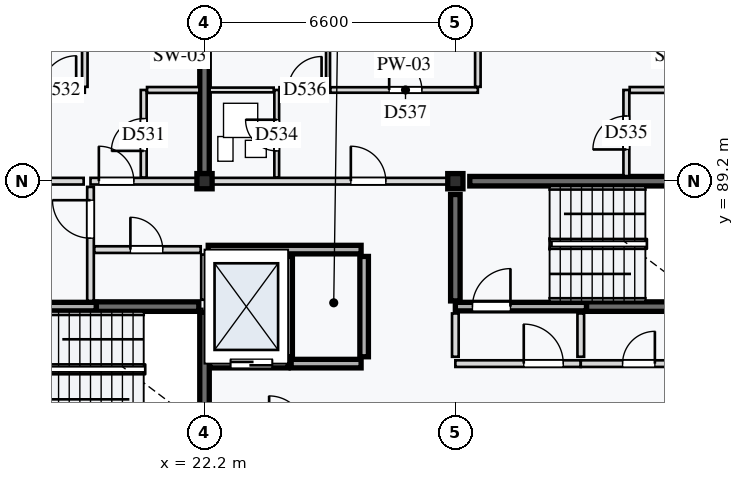
"""IFC4 building model, lengths in metres.
Left out: names, types, materials, properties, quantities, classifications, styles, units other than length and angle.
Written with IfcOpenShell. Run it as: python <this file> out.ifc"""

import sys

from ifc_helpers import new_model, si_unit, direction, frame, frame_2d, origin, origin_2d, place, context, subcontext, project, spatial, rectangle, extrude, element, fill, save


model = new_model("IFC4")
c1 = context("Model", 3, precision=1e-05, world=origin(), true_north=direction((0.0, 1.0)))
c2 = subcontext(c1, "Body", "Model", "MODEL_VIEW")
j1 = project(units=[si_unit("LENGTHUNIT", "METRE"), si_unit("PLANEANGLEUNIT", "RADIAN")], contexts=[c1])
p1 = place(None, origin())
s1 = spatial("IfcSite", under=j1, at=p1, CompositionType="ELEMENT")
p2 = place(p1, origin())
s2 = spatial("IfcBuilding", under=s1, at=p2, CompositionType="ELEMENT")
p3 = place(p2, frame((0.0, 0.0, 53.2)))
s3 = spatial("IfcBuildingStorey", under=s2, at=p3, CompositionType="ELEMENT", Elevation=53.2)
for number, where, z_axis, x_axis in (
    (1, (22.2, 89.2, 0.0), (0.0, 0.0, 1.0), (1.0, 0.0, 0.0)),
    (2, (28.8, 89.2, 0.0), (0.0, 0.0, 1.0), (1.0, 0.0, 0.0)),
):
    element("IfcColumn", number, at=place(p3, frame(where, z_axis=z_axis, x_axis=x_axis)), inside=s3, PredefinedType="COLUMN", context=c2, shape_type="SweptSolid", body=[
        extrude(rectangle(XDim=0.4, YDim=0.4, at=origin_2d()), origin(), (0.0, 0.0, 1.0), 3.2),
    ])
p4 = place(p3, frame((19.35, 85.9, 0.0), z_axis=(0.0, 0.0, 1.0), x_axis=(1.0, 0.0, 0.0)))
e3 = element("IfcWall", 3, at=p4, inside=s3, PredefinedType="SHEAR", context=c2, shape_type="SweptSolid", body=[
    extrude(rectangle(XDim=2.7, YDim=0.25, at=frame_2d((1.35, 0.0))), origin(), (0.0, 0.0, 1.0), 2.98),
])
p5 = place(p3, frame((22.2, 82.95, 0.0), z_axis=(0.0, 0.0, 1.0), x_axis=(0.0, 1.0, 0.0)))
e4 = element("IfcWall", 4, at=p5, inside=s3, PredefinedType="SHEAR", context=c2, shape_type="SweptSolid", body=[
    extrude(rectangle(XDim=2.8, YDim=0.25, at=frame_2d((1.4, 0.0))), origin(), (0.0, 0.0, 1.0), 2.98),
])
p6 = place(p3, frame((29.18, 89.2, 0.0), z_axis=(0.0, 0.0, 1.0), x_axis=(1.0, 0.0, 0.0)))
e5 = element("IfcWall", 5, at=p6, inside=s3, PredefinedType="SHEAR", context=c2, shape_type="SweptSolid", body=[
    extrude(rectangle(XDim=5.84, YDim=0.25, at=frame_2d((2.92, 0.0))), origin(), (0.0, 0.0, 1.0), 2.98),
])
for number, where, z_axis, x_axis in (
    (6, (32.25, 85.9, 0.0), (0.0, 0.0, 1.0), (1.0, 0.0, 0.0)),
    (7, (28.8, 86.05, 0.0), (0.0, 0.0, 1.0), (0.0, 1.0, 0.0)),
):
    element("IfcWall", number, at=place(p3, frame(where, z_axis=z_axis, x_axis=x_axis)), inside=s3, PredefinedType="SHEAR", context=c2, shape_type="SweptSolid", body=[
        extrude(rectangle(XDim=2.8, YDim=0.25, at=frame_2d((1.4, 0.0))), origin(), (0.0, 0.0, 1.0), 2.98),
    ])
p7 = place(p3, frame((22.2, 89.4, 0.0), z_axis=(0.0, 0.0, 1.0), x_axis=(0.0, 1.0, 0.0)))
e8 = element("IfcWall", 8, at=p7, inside=s3, PredefinedType="SHEAR", context=c2, shape_type="SweptSolid", body=[
    extrude(rectangle(XDim=6.2, YDim=0.25, at=frame_2d((3.1, 0.0))), origin(), (0.0, 0.0, 1.0), 2.98),
])
p8 = place(p3, frame((15.75, 85.9, 0.0), z_axis=(0.0, 0.0, 1.0), x_axis=(1.0, 0.0, 0.0)))
e9 = element("IfcWall", 9, at=p8, inside=s3, PredefinedType="STANDARD", context=c2, shape_type="SweptSolid", body=[
    extrude(rectangle(XDim=3.6, YDim=0.225, at=frame_2d((1.8, 0.0))), origin(), (0.0, 0.0, 1.0), 2.945),
])
p9 = place(p8, frame((0.45, 0.0, 0.0)))
e10 = element("IfcOpeningElement", 10, at=p9, cuts=e9, PredefinedType="OPENING", context=c2, shape_type="SweptSolid", body=[
    extrude(rectangle(XDim=1.0, YDim=2.1, at=frame_2d((0.5, 1.05))), frame((0.0, 0.123, 0.0), z_axis=(0.0, -1.0, 0.0), x_axis=(1.0, 0.0, 0.0)), (0.0, 0.0, 1.0), 0.245),
])
p10 = place(p3, frame((19.2, 86.05, 0.0), z_axis=(0.0, 0.0, 1.0), x_axis=(0.0, 1.0, 0.0)))
e11 = element("IfcWall", 11, at=p10, inside=s3, PredefinedType="PARTITIONING", context=c2, shape_type="SweptSolid", body=[
    extrude(rectangle(XDim=3.0, YDim=0.175, at=frame_2d((1.5, 0.0))), origin(), (0.0, 0.0, 1.0), 2.945),
])
p11 = place(p10, frame((1.65, 0.0, 0.0)))
e12 = element("IfcOpeningElement", 12, at=p11, cuts=e11, PredefinedType="OPENING", context=c2, shape_type="SweptSolid", body=[
    extrude(rectangle(XDim=1.0, YDim=2.16, at=frame_2d((0.5, 1.08))), frame((0.0, 0.097, 0.0), z_axis=(0.0, -1.0, 0.0), x_axis=(1.0, 0.0, 0.0)), (0.0, 0.0, 1.0), 0.195),
])
p12 = place(p3, frame((19.3, 87.4, 0.0), z_axis=(0.0, 0.0, 1.0), x_axis=(1.0, 0.0, 0.0)))
e13 = element("IfcWall", 13, at=p12, inside=s3, PredefinedType="PARTITIONING", context=c2, shape_type="SweptSolid", body=[
    extrude(rectangle(XDim=2.8, YDim=0.175, at=frame_2d((1.4, 0.0))), origin(), (0.0, 0.0, 1.0), 2.945),
])
p13 = place(p12, frame((0.95, 0.0, 0.0)))
e14 = element("IfcOpeningElement", 14, at=p13, cuts=e13, PredefinedType="OPENING", context=c2, shape_type="SweptSolid", body=[
    extrude(rectangle(XDim=0.85, YDim=2.0, at=frame_2d((0.425, 1.0))), frame((0.0, 0.097, 0.0), z_axis=(0.0, -1.0, 0.0), x_axis=(1.0, 0.0, 0.0)), (0.0, 0.0, 1.0), 0.195),
])
p14 = place(p3, frame((22.2, 86.08, 0.0), z_axis=(0.0, 0.0, 1.0), x_axis=(0.0, 1.0, 0.0)))
e15 = element("IfcWall", 15, at=p14, inside=s3, PredefinedType="PARTITIONING", context=c2, shape_type="SweptSolid", body=[
    extrude(rectangle(XDim=1.19, YDim=0.175, at=frame_2d((0.595, 0.0))), origin(), (0.0, 0.0, 1.0), 2.945),
])
p15 = place(p3, frame((22.335, 84.4, 0.0), z_axis=(0.0, 0.0, 1.0), x_axis=(1.0, 0.0, 0.0)))
e16 = element("IfcWall", 16, at=p15, inside=s3, PredefinedType="STANDARD", context=c2, shape_type="SweptSolid", body=[
    extrude(rectangle(XDim=2.065, YDim=0.225, at=frame_2d((1.032, 0.0))), origin(), (0.0, 0.0, 1.0), 2.945),
])
p16 = place(p15, frame((0.55, 0.0, 0.0)))
e17 = element("IfcOpeningElement", 17, at=p16, cuts=e16, PredefinedType="OPENING", context=c2, shape_type="SweptSolid", body=[
    extrude(rectangle(XDim=1.1, YDim=2.1, at=frame_2d((0.55, 1.05))), frame((0.0, 0.123, 0.0), z_axis=(0.0, -1.0, 0.0), x_axis=(1.0, 0.0, 0.0)), (0.0, 0.0, 1.0), 0.245),
])
p17 = place(p3, frame((24.48, 84.4, 0.0), z_axis=(0.0, 0.0, 1.0), x_axis=(1.0, 0.0, 0.0)))
e18 = element("IfcWall", 18, at=p17, inside=s3, PredefinedType="STANDARD", context=c2, shape_type="SweptSolid", body=[
    extrude(rectangle(XDim=1.84, YDim=0.225, at=frame_2d((0.92, 0.0))), origin(), (0.0, 0.0, 1.0), 2.945),
])
p18 = place(p3, frame((22.298, 87.4, 0.0), z_axis=(0.0, 0.0, 1.0), x_axis=(1.0, 0.0, 0.0)))
e19 = element("IfcWall", 19, at=p18, inside=s3, PredefinedType="STANDARD", context=c2, shape_type="SweptSolid", body=[
    extrude(rectangle(XDim=4.022, YDim=0.225, at=frame_2d((2.011, 0.0))), origin(), (0.0, 0.0, 1.0), 2.945),
])
for number, where, z_axis, x_axis in (
    (20, (24.4, 84.58, 0.0), (0.0, 0.0, 1.0), (0.0, 1.0, 0.0)),
    (21, (26.4, 84.58, 0.0), (0.0, 0.0, 1.0), (0.0, 1.0, 0.0)),
):
    element("IfcWall", number, at=place(p3, frame(where, z_axis=z_axis, x_axis=x_axis)), inside=s3, PredefinedType="STANDARD", context=c2, shape_type="SweptSolid", body=[
        extrude(rectangle(XDim=2.64, YDim=0.225, at=frame_2d((1.32, 0.0))), origin(), (0.0, 0.0, 1.0), 2.945),
    ])
p19 = place(p3, frame((28.8, 85.9, 0.0), z_axis=(0.0, 0.0, 1.0), x_axis=(1.0, 0.0, 0.0)))
e22 = element("IfcWall", 22, at=p19, inside=s3, PredefinedType="STANDARD", context=c2, shape_type="SweptSolid", body=[
    extrude(rectangle(XDim=3.45, YDim=0.225, at=frame_2d((1.725, 0.0))), origin(), (0.0, 0.0, 1.0), 2.945),
])
p20 = place(p19, frame((0.45, 0.0, 0.0)))
e23 = element("IfcOpeningElement", 23, at=p20, cuts=e22, PredefinedType="OPENING", context=c2, shape_type="SweptSolid", body=[
    extrude(rectangle(XDim=1.0, YDim=2.16, at=frame_2d((0.5, 1.08))), frame((0.0, 0.123, 0.0), z_axis=(0.0, -1.0, 0.0), x_axis=(1.0, 0.0, 0.0)), (0.0, 0.0, 1.0), 0.245),
])
p21 = place(p3, frame((28.8, 84.4, 0.0), z_axis=(0.0, 0.0, 1.0), x_axis=(1.0, 0.0, 0.0)))
e24 = element("IfcWall", 24, at=p21, inside=s3, PredefinedType="PARTITIONING", context=c2, shape_type="SweptSolid", body=[
    extrude(rectangle(XDim=3.3, YDim=0.175, at=frame_2d((1.65, 0.0))), origin(), (0.0, 0.0, 1.0), 2.945),
])
p22 = place(p21, frame((1.8, 0.0, 0.0)))
e25 = element("IfcOpeningElement", 25, at=p22, cuts=e24, PredefinedType="OPENING", context=c2, shape_type="SweptSolid", body=[
    extrude(rectangle(XDim=1.04, YDim=2.12, at=frame_2d((0.52, 1.06))), frame((0.0, 0.097, 0.0), z_axis=(0.0, -1.0, 0.0), x_axis=(1.0, 0.0, 0.0)), (0.0, 0.0, 1.0), 0.195),
])
p23 = place(p3, frame((32.1, 84.4, 0.0), z_axis=(0.0, 0.0, 1.0), x_axis=(1.0, 0.0, 0.0)))
e26 = element("IfcWall", 26, at=p23, inside=s3, PredefinedType="PARTITIONING", context=c2, shape_type="SweptSolid", body=[
    extrude(rectangle(XDim=3.3, YDim=0.175, at=frame_2d((1.65, 0.0))), origin(), (0.0, 0.0, 1.0), 2.945),
])
p24 = place(p23, frame((1.1, 0.0, 0.0)))
e27 = element("IfcOpeningElement", 27, at=p24, cuts=e26, PredefinedType="OPENING", context=c2, shape_type="SweptSolid", body=[
    extrude(rectangle(XDim=0.85, YDim=2.0, at=frame_2d((0.425, 1.0))), frame((0.0, 0.097, 0.0), z_axis=(0.0, -1.0, 0.0), x_axis=(1.0, 0.0, 0.0)), (0.0, 0.0, 1.0), 0.195),
])
for number, where, z_axis, x_axis in (
    (28, (28.8, 84.58, 0.0), (0.0, 0.0, 1.0), (0.0, 1.0, 0.0)),
    (29, (32.1, 84.58, 0.0), (0.0, 0.0, 1.0), (0.0, 1.0, 0.0)),
):
    element("IfcWall", number, at=place(p3, frame(where, z_axis=z_axis, x_axis=x_axis)), inside=s3, PredefinedType="PARTITIONING", context=c2, shape_type="SweptSolid", body=[
        extrude(rectangle(XDim=1.14, YDim=0.175, at=frame_2d((0.57, 0.0))), origin(), (0.0, 0.0, 1.0), 2.945),
    ])
p25 = place(p3, frame((15.88, 89.2, 0.0), z_axis=(0.0, 0.0, 1.0), x_axis=(1.0, 0.0, 0.0)))
e30 = element("IfcWall", 30, at=p25, inside=s3, PredefinedType="PARTITIONING", context=c2, shape_type="SweptSolid", body=[
    extrude(rectangle(XDim=3.14, YDim=0.175, at=frame_2d((1.57, 0.0))), origin(), (0.0, 0.0, 1.0), 2.7),
])
p26 = place(p3, frame((19.2, 89.2, 0.0), z_axis=(0.0, 0.0, 1.0), x_axis=(1.0, 0.0, 0.0)))
e31 = element("IfcWall", 31, at=p26, inside=s3, PredefinedType="PARTITIONING", context=c2, shape_type="SweptSolid", body=[
    extrude(rectangle(XDim=3.0, YDim=0.175, at=frame_2d((1.5, 0.0))), origin(), (0.0, 0.0, 1.0), 2.7),
])
p27 = place(p26, frame((0.22, 0.0, 0.0)))
e32 = element("IfcOpeningElement", 32, at=p27, cuts=e31, PredefinedType="OPENING", context=c2, shape_type="SweptSolid", body=[
    extrude(rectangle(XDim=0.92, YDim=2.14, at=frame_2d((0.46, 1.07))), frame((0.0, 0.097, 0.0), z_axis=(0.0, -1.0, 0.0), x_axis=(1.0, 0.0, 0.0)), (0.0, 0.0, 1.0), 0.195),
])
p28 = place(p3, frame((20.6, 89.298, 0.0), z_axis=(0.0, 0.0, 1.0), x_axis=(0.0, 1.0, 0.0)))
e33 = element("IfcWall", 33, at=p28, inside=s3, PredefinedType="PARTITIONING", context=c2, shape_type="SweptSolid", body=[
    extrude(rectangle(XDim=2.302, YDim=0.155, at=frame_2d((1.151, 0.0))), origin(), (0.0, 0.0, 1.0), 2.945),
])
p29 = place(p28, frame((0.7, 0.0, 0.0)))
e34 = element("IfcOpeningElement", 34, at=p29, cuts=e33, PredefinedType="OPENING", context=c2, shape_type="SweptSolid", body=[
    extrude(rectangle(XDim=0.85, YDim=2.1, at=frame_2d((0.425, 1.05))), frame((0.0, 0.087, 0.0), z_axis=(0.0, -1.0, 0.0), x_axis=(1.0, 0.0, 0.0)), (0.0, 0.0, 1.0), 0.175),
])
p30 = place(p3, frame((20.688, 91.6, 0.0), z_axis=(0.0, 0.0, 1.0), x_axis=(1.0, 0.0, 0.0)))
e35 = element("IfcWall", 35, at=p30, inside=s3, PredefinedType="PARTITIONING", context=c2, shape_type="SweptSolid", body=[
    extrude(rectangle(XDim=1.377, YDim=0.155, at=frame_2d((0.689, 0.0))), origin(), (0.0, 0.0, 1.0), 2.945),
])
p31 = place(p3, frame((17.573, 91.6, 0.0), z_axis=(0.0, 0.0, 1.0), x_axis=(1.0, 0.0, 0.0)))
e36 = element("IfcWall", 36, at=p31, inside=s3, PredefinedType="PARTITIONING", context=c2, shape_type="SweptSolid", body=[
    extrude(rectangle(XDim=1.478, YDim=0.145, at=frame_2d((0.739, 0.0))), origin(), (0.0, 0.0, 1.0), 2.945),
])
p32 = place(p31, frame((0.35, 0.0, 0.0)))
e37 = element("IfcOpeningElement", 37, at=p32, cuts=e36, PredefinedType="OPENING", context=c2, shape_type="SweptSolid", body=[
    extrude(rectangle(XDim=0.9, YDim=2.1, at=frame_2d((0.45, 1.05))), frame((0.0, 0.083, 0.0), z_axis=(0.0, -1.0, 0.0), x_axis=(1.0, 0.0, 0.0)), (0.0, 0.0, 1.0), 0.165),
])
p33 = place(p3, frame((19.05, 91.683, 0.0), z_axis=(0.0, 0.0, 1.0), x_axis=(0.0, 1.0, 0.0)))
e38 = element("IfcWall", 38, at=p33, inside=s3, PredefinedType="PARTITIONING", context=c2, shape_type="SweptSolid", body=[
    extrude(rectangle(XDim=3.987, YDim=0.145, at=frame_2d((1.994, 0.0))), origin(), (0.0, 0.0, 1.0), 2.945),
])
p34 = place(p3, frame((22.2, 89.2, 0.0), z_axis=(0.0, 0.0, 1.0), x_axis=(1.0, 0.0, 0.0)))
e39 = element("IfcWall", 39, at=p34, inside=s3, PredefinedType="PARTITIONING", context=c2, shape_type="SweptSolid", body=[
    extrude(rectangle(XDim=6.6, YDim=0.175, at=frame_2d((3.3, 0.0))), origin(), (0.0, 0.0, 1.0), 2.7),
])
p35 = place(p34, frame((3.85, 0.0, 0.0)))
e40 = element("IfcOpeningElement", 40, at=p35, cuts=e39, PredefinedType="OPENING", context=c2, shape_type="SweptSolid", body=[
    extrude(rectangle(XDim=0.92, YDim=2.14, at=frame_2d((0.46, 1.07))), frame((0.0, 0.097, 0.0), z_axis=(0.0, -1.0, 0.0), x_axis=(1.0, 0.0, 0.0)), (0.0, 0.0, 1.0), 0.195),
])
p36 = place(p3, frame((24.1, 89.298, 0.0), z_axis=(0.0, 0.0, 1.0), x_axis=(0.0, 1.0, 0.0)))
e41 = element("IfcWall", 41, at=p36, inside=s3, PredefinedType="PARTITIONING", context=c2, shape_type="SweptSolid", body=[
    extrude(rectangle(XDim=2.302, YDim=0.125, at=frame_2d((1.151, 0.0))), origin(), (0.0, 0.0, 1.0), 2.945),
])
p37 = place(p36, frame((0.7, 0.0, 0.0)))
e42 = element("IfcOpeningElement", 42, at=p37, cuts=e41, PredefinedType="OPENING", context=c2, shape_type="SweptSolid", body=[
    extrude(rectangle(XDim=0.82, YDim=2.05, at=frame_2d((0.41, 1.025))), frame((0.0, 0.073, 0.0), z_axis=(0.0, -1.0, 0.0), x_axis=(1.0, 0.0, 0.0)), (0.0, 0.0, 1.0), 0.145),
])
p38 = place(p3, frame((22.335, 91.6, 0.0), z_axis=(0.0, 0.0, 1.0), x_axis=(1.0, 0.0, 0.0)))
e43 = element("IfcWall", 43, at=p38, inside=s3, PredefinedType="PARTITIONING", context=c2, shape_type="SweptSolid", body=[
    extrude(rectangle(XDim=1.685, YDim=0.125, at=frame_2d((0.843, 0.0))), origin(), (0.0, 0.0, 1.0), 2.945),
])
p39 = place(p3, frame((33.3, 89.335, 0.0), z_axis=(0.0, 0.0, 1.0), x_axis=(0.0, 1.0, 0.0)))
e44 = element("IfcWall", 44, at=p39, inside=s3, PredefinedType="PARTITIONING", context=c2, shape_type="SweptSolid", body=[
    extrude(rectangle(XDim=2.265, YDim=0.155, at=frame_2d((1.133, 0.0))), origin(), (0.0, 0.0, 1.0), 2.945),
])
p40 = place(p39, frame((0.7, 0.0, 0.0)))
e45 = element("IfcOpeningElement", 45, at=p40, cuts=e44, PredefinedType="OPENING", context=c2, shape_type="SweptSolid", body=[
    extrude(rectangle(XDim=0.88, YDim=2.1, at=frame_2d((0.44, 1.05))), frame((0.0, 0.087, 0.0), z_axis=(0.0, -1.0, 0.0), x_axis=(1.0, 0.0, 0.0)), (0.0, 0.0, 1.0), 0.175),
])
p41 = place(p3, frame((33.387, 91.6, 0.0), z_axis=(0.0, 0.0, 1.0), x_axis=(1.0, 0.0, 0.0)))
e46 = element("IfcWall", 46, at=p41, inside=s3, PredefinedType="PARTITIONING", context=c2, shape_type="SweptSolid", body=[
    extrude(rectangle(XDim=1.877, YDim=0.155, at=frame_2d((0.939, 0.0))), origin(), (0.0, 0.0, 1.0), 2.945),
])
p42 = place(p3, frame((24.173, 91.6, 0.0), z_axis=(0.0, 0.0, 1.0), x_axis=(1.0, 0.0, 0.0)))
e47 = element("IfcWall", 47, at=p42, inside=s3, PredefinedType="PARTITIONING", context=c2, shape_type="SweptSolid", body=[
    extrude(rectangle(XDim=1.277, YDim=0.145, at=frame_2d((0.639, 0.0))), origin(), (0.0, 0.0, 1.0), 2.945),
])
p43 = place(p42, frame((0.228, 0.0, 0.0)))
e48 = element("IfcOpeningElement", 48, at=p43, cuts=e47, PredefinedType="OPENING", context=c2, shape_type="SweptSolid", body=[
    extrude(rectangle(XDim=0.88, YDim=2.16, at=frame_2d((0.44, 1.08))), frame((0.0, 0.083, 0.0), z_axis=(0.0, -1.0, 0.0), x_axis=(1.0, 0.0, 0.0)), (0.0, 0.0, 1.0), 0.165),
])
p44 = place(p3, frame((25.45, 91.683, 0.0), z_axis=(0.0, 0.0, 1.0), x_axis=(0.0, 1.0, 0.0)))
e49 = element("IfcWall", 49, at=p44, inside=s3, PredefinedType="PARTITIONING", context=c2, shape_type="SweptSolid", body=[
    extrude(rectangle(XDim=3.987, YDim=0.105, at=frame_2d((1.994, 0.0))), origin(), (0.0, 0.0, 1.0), 2.945),
])
p45 = place(p3, frame((25.512, 91.6, 0.0), z_axis=(0.0, 0.0, 1.0), x_axis=(1.0, 0.0, 0.0)))
e50 = element("IfcWall", 50, at=p45, inside=s3, PredefinedType="PARTITIONING", context=c2, shape_type="SweptSolid", body=[
    extrude(rectangle(XDim=3.88, YDim=0.145, at=frame_2d((1.94, 0.0))), origin(), (0.0, 0.0, 1.0), 2.945),
])
p46 = place(p45, frame((1.546, 0.0, 0.0)))
e51 = element("IfcOpeningElement", 51, at=p46, cuts=e50, PredefinedType="OPENING", context=c2, shape_type="SweptSolid", body=[
    extrude(rectangle(XDim=0.86, YDim=2.12, at=frame_2d((0.43, 1.06))), frame((0.0, 0.083, 0.0), z_axis=(0.0, -1.0, 0.0), x_axis=(1.0, 0.0, 0.0)), (0.0, 0.0, 1.0), 0.165),
])
p47 = place(p3, frame((29.392, 91.683, 0.0), z_axis=(0.0, 0.0, 1.0), x_axis=(0.0, 1.0, 0.0)))
e52 = element("IfcWall", 52, at=p47, inside=s3, PredefinedType="PARTITIONING", context=c2, shape_type="SweptSolid", body=[
    extrude(rectangle(XDim=3.987, YDim=0.145, at=frame_2d((1.994, 0.0))), origin(), (0.0, 0.0, 1.0), 2.945),
])
p48 = place(p11, origin())
e53 = element("IfcDoor", 53, at=p48, inside=s3, OperationType="SINGLE_SWING_RIGHT", PredefinedType="DOOR", context=c2, shape_type="SweptSolid", body=[
    extrude(rectangle(XDim=1.0, YDim=2.16, at=frame_2d((0.5, 1.08))), frame((0.0, 0.025, 0.0), z_axis=(0.0, -1.0, 0.0), x_axis=(1.0, 0.0, 0.0)), (0.0, 0.0, 1.0), 0.05),
])
fill(e12, e53)
p49 = place(p13, origin())
e54 = element("IfcDoor", 54, at=p49, inside=s3, OperationType="SINGLE_SWING_LEFT", PredefinedType="DOOR", context=c2, shape_type="SweptSolid", body=[
    extrude(rectangle(XDim=0.85, YDim=2.0, at=frame_2d((0.425, 1.0))), frame((0.0, 0.025, 0.0), z_axis=(0.0, -1.0, 0.0), x_axis=(1.0, 0.0, 0.0)), (0.0, 0.0, 1.0), 0.05),
])
fill(e14, e54)
p50 = place(p16, origin())
e55 = element("IfcDoor", 55, at=p50, inside=s3, OperationType="DOUBLE_DOOR_SLIDING", PredefinedType="DOOR", context=c2, shape_type="SweptSolid", body=[
    extrude(rectangle(XDim=1.1, YDim=2.1, at=frame_2d((0.55, 1.05))), frame((0.0, 0.025, 0.0), z_axis=(0.0, -1.0, 0.0), x_axis=(1.0, 0.0, 0.0)), (0.0, 0.0, 1.0), 0.05),
])
fill(e17, e55)
p51 = place(p20, origin())
e56 = element("IfcDoor", 56, at=p51, inside=s3, OperationType="SINGLE_SWING_RIGHT", PredefinedType="DOOR", context=c2, shape_type="SweptSolid", body=[
    extrude(rectangle(XDim=1.0, YDim=2.16, at=frame_2d((0.5, 1.08))), frame((0.0, 0.025, 0.0), z_axis=(0.0, -1.0, 0.0), x_axis=(1.0, 0.0, 0.0)), (0.0, 0.0, 1.0), 0.05),
])
fill(e23, e56)
p52 = place(p22, origin())
e57 = element("IfcDoor", 57, at=p52, inside=s3, OperationType="SINGLE_SWING_LEFT", PredefinedType="DOOR", context=c2, shape_type="SweptSolid", body=[
    extrude(rectangle(XDim=1.04, YDim=2.12, at=frame_2d((0.52, 1.06))), frame((0.0, 0.025, 0.0), z_axis=(0.0, -1.0, 0.0), x_axis=(1.0, 0.0, 0.0)), (0.0, 0.0, 1.0), 0.05),
])
fill(e25, e57)
p53 = place(p24, origin())
e58 = element("IfcDoor", 58, at=p53, inside=s3, OperationType="SINGLE_SWING_RIGHT", PredefinedType="DOOR", context=c2, shape_type="SweptSolid", body=[
    extrude(rectangle(XDim=0.85, YDim=2.0, at=frame_2d((0.425, 1.0))), frame((0.0, 0.025, 0.0), z_axis=(0.0, -1.0, 0.0), x_axis=(1.0, 0.0, 0.0)), (0.0, 0.0, 1.0), 0.05),
])
fill(e27, e58)
p54 = place(p27, origin())
e59 = element("IfcDoor", 59, at=p54, inside=s3, OperationType="SINGLE_SWING_LEFT", PredefinedType="DOOR", context=c2, shape_type="SweptSolid", body=[
    extrude(rectangle(XDim=0.92, YDim=2.14, at=frame_2d((0.46, 1.07))), frame((0.0, 0.025, 0.0), z_axis=(0.0, -1.0, 0.0), x_axis=(1.0, 0.0, 0.0)), (0.0, 0.0, 1.0), 0.05),
])
fill(e32, e59)
p55 = place(p29, origin())
e60 = element("IfcDoor", 60, at=p55, inside=s3, OperationType="SINGLE_SWING_LEFT", PredefinedType="DOOR", context=c2, shape_type="SweptSolid", body=[
    extrude(rectangle(XDim=0.85, YDim=2.1, at=frame_2d((0.425, 1.05))), frame((0.0, 0.025, 0.0), z_axis=(0.0, -1.0, 0.0), x_axis=(1.0, 0.0, 0.0)), (0.0, 0.0, 1.0), 0.05),
])
fill(e34, e60)
p56 = place(p32, origin())
e61 = element("IfcDoor", 61, at=p56, inside=s3, OperationType="SINGLE_SWING_RIGHT", PredefinedType="DOOR", context=c2, shape_type="SweptSolid", body=[
    extrude(rectangle(XDim=0.9, YDim=2.1, at=frame_2d((0.45, 1.05))), frame((0.0, 0.025, 0.0), z_axis=(0.0, -1.0, 0.0), x_axis=(1.0, 0.0, 0.0)), (0.0, 0.0, 1.0), 0.05),
])
fill(e37, e61)
p57 = place(p35, origin())
e62 = element("IfcDoor", 62, at=p57, inside=s3, OperationType="SINGLE_SWING_LEFT", PredefinedType="DOOR", context=c2, shape_type="SweptSolid", body=[
    extrude(rectangle(XDim=0.92, YDim=2.14, at=frame_2d((0.46, 1.07))), frame((0.0, 0.025, 0.0), z_axis=(0.0, -1.0, 0.0), x_axis=(1.0, 0.0, 0.0)), (0.0, 0.0, 1.0), 0.05),
])
fill(e40, e62)
p58 = place(p37, origin())
e63 = element("IfcDoor", 63, at=p58, inside=s3, OperationType="SINGLE_SWING_RIGHT", PredefinedType="DOOR", context=c2, shape_type="SweptSolid", body=[
    extrude(rectangle(XDim=0.82, YDim=2.05, at=frame_2d((0.41, 1.025))), frame((0.0, 0.025, 0.0), z_axis=(0.0, -1.0, 0.0), x_axis=(1.0, 0.0, 0.0)), (0.0, 0.0, 1.0), 0.05),
])
fill(e42, e63)
p59 = place(p40, origin())
e64 = element("IfcDoor", 64, at=p59, inside=s3, OperationType="SINGLE_SWING_LEFT", PredefinedType="DOOR", context=c2, shape_type="SweptSolid", body=[
    extrude(rectangle(XDim=0.88, YDim=2.1, at=frame_2d((0.44, 1.05))), frame((0.0, 0.025, 0.0), z_axis=(0.0, -1.0, 0.0), x_axis=(1.0, 0.0, 0.0)), (0.0, 0.0, 1.0), 0.05),
])
fill(e45, e64)
p60 = place(p43, origin())
e65 = element("IfcDoor", 65, at=p60, inside=s3, OperationType="SINGLE_SWING_RIGHT", PredefinedType="DOOR", context=c2, shape_type="SweptSolid", body=[
    extrude(rectangle(XDim=0.88, YDim=2.16, at=frame_2d((0.44, 1.08))), frame((0.0, 0.025, 0.0), z_axis=(0.0, -1.0, 0.0), x_axis=(1.0, 0.0, 0.0)), (0.0, 0.0, 1.0), 0.05),
])
fill(e48, e65)
p61 = place(p46, origin())
e66 = element("IfcDoor", 66, at=p61, inside=s3, OperationType="SINGLE_SWING_LEFT", PredefinedType="DOOR", context=c2, shape_type="SweptSolid", body=[
    extrude(rectangle(XDim=0.86, YDim=2.12, at=frame_2d((0.43, 1.06))), frame((0.0, 0.025, 0.0), z_axis=(0.0, -1.0, 0.0), x_axis=(1.0, 0.0, 0.0)), (0.0, 0.0, 1.0), 0.05),
])
fill(e51, e66)
save(model, sys.argv[1])
